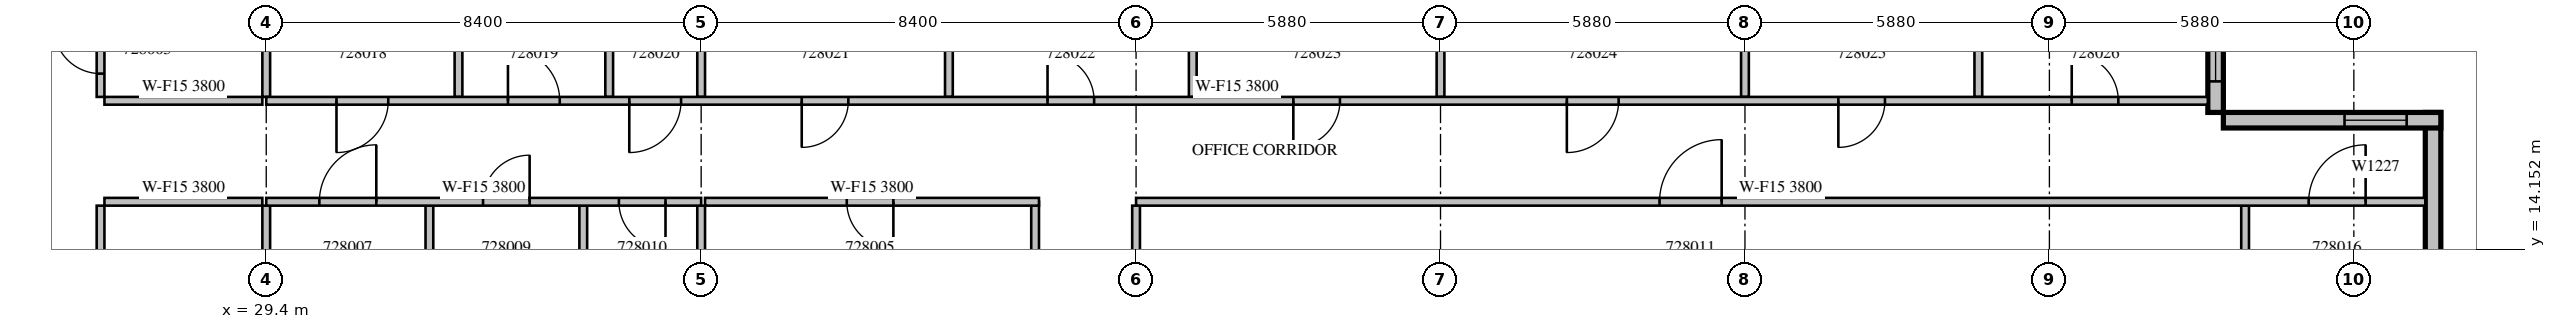
"""IFC4 building model, lengths in metres.
Left out: names, types, materials, properties, quantities, classifications, styles, units other than length and angle.
Written with IfcOpenShell. Run it as: python <this file> out.ifc"""

import sys

from ifc_helpers import new_model, si_unit, direction, frame, frame_2d, origin, place, context, subcontext, project, spatial, rectangle, extrude, source, transform, mapped, element, fill, save


model = new_model("IFC4")
c1 = context("Model", 3, precision=1e-05, world=origin(), true_north=direction((0.0, 1.0)))
c2 = subcontext(c1, "Body", "Model", "MODEL_VIEW")
j1 = project(units=[si_unit("LENGTHUNIT", "METRE"), si_unit("PLANEANGLEUNIT", "RADIAN")], contexts=[c1])
p1 = place(None, origin())
s1 = spatial("IfcSite", under=j1, at=p1, CompositionType="ELEMENT")
p2 = place(p1, origin())
s2 = spatial("IfcBuilding", under=s1, at=p2, CompositionType="ELEMENT")
p3 = place(p2, frame((0.0, 0.0, 128.7)))
s3 = spatial("IfcBuildingStorey", under=s2, at=p3, CompositionType="ELEMENT", Elevation=128.7)
m1 = source(origin(), c2, "Body", "SweptSolid", [
    extrude(rectangle(XDim=6.3, YDim=0.3, at=frame_2d((3.15, 0.0))), origin(), (0.0, 0.0, 1.0), 3.8),
])
p4 = place(p3, frame((71.25, 10.5, 0.0), z_axis=(0.0, 0.0, 1.0), x_axis=(0.0, 1.0, 0.0)))
e1 = element("IfcWall", 1, at=p4, inside=s3, PredefinedType="STANDARD", context=c2, shape_type="MappedRepresentation", body=[
    mapped(m1, transform((0.0, 0.0, 0.0), scale=1.0)),
])
m2 = source(origin(), c2, "Body", "SweptSolid", [
    extrude(rectangle(XDim=1.2, YDim=2.7, at=frame_2d((0.6, 1.35))), frame((0.0, 0.16, 0.0), z_axis=(0.0, -1.0, 0.0), x_axis=(1.0, 0.0, 0.0)), (0.0, 0.0, 1.0), 0.32),
])
p5 = place(p4, frame((1.025, 0.0, 0.6)))
e2 = element("IfcOpeningElement", 2, at=p5, cuts=e1, PredefinedType="OPENING", context=c2, shape_type="MappedRepresentation", body=[
    mapped(m2, transform((0.0, 0.0, 0.0), scale=1.0)),
])
m3 = source(origin(), c2, "Body", "SweptSolid", [
    extrude(rectangle(XDim=4.2, YDim=0.3, at=frame_2d((2.1, 0.0))), origin(), (0.0, 0.0, 1.0), 3.8),
])
p6 = place(p3, frame((71.4, 16.65, 0.0), z_axis=(0.0, 0.0, 1.0), x_axis=(-1.0, 0.0, 0.0)))
e3 = element("IfcWall", 3, at=p6, inside=s3, PredefinedType="STANDARD", context=c2, shape_type="MappedRepresentation", body=[
    mapped(m3, transform((0.0, 0.0, 0.0), scale=1.0)),
])
p7 = place(p6, frame((0.66, 0.0, 0.6)))
e4 = element("IfcOpeningElement", 4, at=p7, cuts=e3, PredefinedType="OPENING", context=c2, shape_type="MappedRepresentation", body=[
    mapped(m2, transform((0.0, 0.0, 0.0), scale=1.0)),
])
p8 = place(p3, frame((67.05, 16.8, 0.0), z_axis=(0.0, 0.0, 1.0), x_axis=(0.0, 1.0, 0.0)))
e5 = element("IfcWall", 5, at=p8, inside=s3, PredefinedType="STANDARD", context=c2, shape_type="MappedRepresentation", body=[
    mapped(m3, transform((0.0, 0.0, 0.0), scale=1.0)),
])
m4 = source(origin(), c2, "Body", "SweptSolid", [
    extrude(rectangle(XDim=3.0, YDim=2.7, at=frame_2d((1.5, 1.35))), frame((0.0, 0.16, 0.0), z_axis=(0.0, -1.0, 0.0), x_axis=(1.0, 0.0, 0.0)), (0.0, 0.0, 1.0), 0.32),
])
p9 = place(p8, frame((0.6, 0.0, 0.6)))
e6 = element("IfcOpeningElement", 6, at=p9, cuts=e5, PredefinedType="OPENING", context=c2, shape_type="MappedRepresentation", body=[
    mapped(m4, transform((0.0, 0.0, 0.0), scale=1.0)),
])
p10 = place(p3, frame((26.2, 15.0, 0.0), z_axis=(0.0, 0.0, 1.0), x_axis=(0.0, -1.0, 0.0)))
e7 = element("IfcWall", 7, at=p10, inside=s3, PredefinedType="PARTITIONING", context=c2, shape_type="SweptSolid", body=[
    extrude(rectangle(XDim=11.725, YDim=0.15, at=frame_2d((5.862, 0.0))), origin(), (0.0, 0.0, 1.0), 2.8),
])
m5 = source(origin(), c2, "Body", "SweptSolid", [
    extrude(rectangle(XDim=0.9, YDim=2.1, at=frame_2d((0.45, 1.05))), frame((0.0, 0.085, 0.0), z_axis=(0.0, -1.0, 0.0), x_axis=(1.0, 0.0, 0.0)), (0.0, 0.0, 1.0), 0.17),
])
p11 = place(p10, frame((9.463, 0.0, 0.0)))
e8 = element("IfcOpeningElement", 8, at=p11, cuts=e7, PredefinedType="OPENING", context=c2, shape_type="MappedRepresentation", body=[
    mapped(m5, transform((0.0, 0.0, 0.0), scale=1.0)),
])
p12 = place(p10, frame((2.725, 0.0, 0.0)))
e9 = element("IfcOpeningElement", 9, at=p12, cuts=e7, PredefinedType="OPENING", context=c2, shape_type="MappedRepresentation", body=[
    mapped(m5, transform((0.0, 0.0, 0.0), scale=1.0)),
])
m6 = source(origin(), c2, "Body", "SweptSolid", [
    extrude(rectangle(XDim=3.6, YDim=0.15, at=frame_2d((1.8, 0.0))), origin(), (0.0, 0.0, 1.0), 3.8),
])
p13 = place(p3, frame((26.2, 20.7, 0.0), z_axis=(0.0, 0.0, 1.0), x_axis=(0.0, -1.0, 0.0)))
e10 = element("IfcWall", 10, at=p13, inside=s3, PredefinedType="PARTITIONING", context=c2, shape_type="MappedRepresentation", body=[
    mapped(m6, transform((0.0, 0.0, 0.0), scale=1.0)),
])
p14 = place(p13, frame((2.25, 0.0, 0.0)))
e11 = element("IfcOpeningElement", 11, at=p14, cuts=e10, PredefinedType="OPENING", context=c2, shape_type="MappedRepresentation", body=[
    mapped(m5, transform((0.0, 0.0, 0.0), scale=1.0)),
])
m7 = source(origin(), c2, "Body", "SweptSolid", [
    extrude(rectangle(XDim=3.05, YDim=0.15, at=frame_2d((1.525, 0.0))), origin(), (0.0, 0.0, 1.0), 3.8),
])
for number, where, z_axis, x_axis in (
    (12, (29.325, 15.075, 0.0), (0.0, 0.0, 1.0), (-1.0, 0.0, 0.0)),
    (13, (26.275, 17.025, 0.0), (0.0, 0.0, 1.0), (1.0, 0.0, 0.0)),
):
    element("IfcWall", number, at=place(p3, frame(where, z_axis=z_axis, x_axis=x_axis)), inside=s3, PredefinedType="PARTITIONING", context=c2, shape_type="MappedRepresentation", body=[
        mapped(m7, transform((0.0, 0.0, 0.0), scale=1.0)),
    ])
m8 = source(origin(), c2, "Body", "SweptSolid", [
    extrude(rectangle(XDim=3.976, YDim=0.15, at=frame_2d((1.988, 0.0))), origin(), (0.0, 0.0, 1.0), 3.8),
])
p15 = place(p3, frame((29.4, 11.024, 0.0), z_axis=(0.0, 0.0, 1.0), x_axis=(0.0, 1.0, 0.0)))
e14 = element("IfcWall", 14, at=p15, inside=s3, PredefinedType="PARTITIONING", context=c2, shape_type="MappedRepresentation", body=[
    mapped(m8, transform((0.0, 0.0, 0.0), scale=1.0)),
])
m9 = source(origin(), c2, "Body", "SweptSolid", [
    extrude(rectangle(XDim=2.851, YDim=0.15, at=frame_2d((1.425, 0.0))), origin(), (0.0, 0.0, 1.0), 3.8),
])
p16 = place(p3, frame((29.4, 17.1, 0.0), z_axis=(0.0, 0.0, 1.0), x_axis=(0.0, 1.0, 0.0)))
e15 = element("IfcWall", 15, at=p16, inside=s3, PredefinedType="PARTITIONING", context=c2, shape_type="MappedRepresentation", body=[
    mapped(m9, transform((0.0, 0.0, 0.0), scale=1.0)),
])
m10 = source(origin(), c2, "Body", "SweptSolid", [
    extrude(rectangle(XDim=3.175, YDim=0.15, at=frame_2d((1.587, 0.0))), origin(), (0.0, 0.0, 1.0), 3.8),
])
p17 = place(p3, frame((44.25, 11.9, 0.0), z_axis=(0.0, 0.0, 1.0), x_axis=(0.0, 1.0, 0.0)))
e16 = element("IfcWall", 16, at=p17, inside=s3, PredefinedType="PARTITIONING", context=c2, shape_type="MappedRepresentation", body=[
    mapped(m10, transform((0.0, 0.0, 0.0), scale=1.0)),
])
m11 = source(origin(), c2, "Body", "SweptSolid", [
    extrude(rectangle(XDim=6.45, YDim=0.15, at=frame_2d((3.225, 0.0))), origin(), (0.0, 0.0, 1.0), 3.8),
])
p18 = place(p3, frame((44.325, 15.075, 0.0), z_axis=(0.0, 0.0, 1.0), x_axis=(-1.0, 0.0, 0.0)))
e17 = element("IfcWall", 17, at=p18, inside=s3, PredefinedType="PARTITIONING", context=c2, shape_type="MappedRepresentation", body=[
    mapped(m11, transform((0.0, 0.0, 0.0), scale=1.0)),
])
p19 = place(p18, frame((2.812, 0.0, 0.0)))
e18 = element("IfcOpeningElement", 18, at=p19, cuts=e17, PredefinedType="OPENING", context=c2, shape_type="MappedRepresentation", body=[
    mapped(m5, transform((0.0, 0.0, 0.0), scale=1.0)),
])
m12 = source(origin(), c2, "Body", "SweptSolid", [
    extrude(rectangle(XDim=3.825, YDim=0.15, at=frame_2d((1.913, 0.0))), origin(), (0.0, 0.0, 1.0), 3.8),
])
for number, where, z_axis, x_axis in (
    (19, (32.551, 11.175, 0.0), (0.0, 0.0, 1.0), (0.0, 1.0, 0.0)),
    (20, (35.523, 11.175, 0.0), (0.0, 0.0, 1.0), (0.0, 1.0, 0.0)),
    (21, (37.8, 11.175, 0.0), (0.0, 0.0, 1.0), (0.0, 1.0, 0.0)),
    (22, (46.2, 11.175, 0.0), (0.0, 0.0, 1.0), (0.0, 1.0, 0.0)),
    (23, (67.62, 11.175, 0.0), (0.0, 0.0, 1.0), (0.0, 1.0, 0.0)),
):
    element("IfcWall", number, at=place(p3, frame(where, z_axis=z_axis, x_axis=x_axis)), inside=s3, PredefinedType="PARTITIONING", context=c2, shape_type="MappedRepresentation", body=[
        mapped(m12, transform((0.0, 0.0, 0.0), scale=1.0)),
    ])
for number, where, z_axis, x_axis in (
    (24, (33.113, 20.7, 0.0), (0.0, 0.0, 1.0), (0.0, -1.0, 0.0)),
    (25, (36.024, 20.7, 0.0), (0.0, 0.0, 1.0), (0.0, -1.0, 0.0)),
    (26, (42.585, 20.7, 0.0), (0.0, 0.0, 1.0), (0.0, -1.0, 0.0)),
    (27, (47.295, 20.7, 0.0), (0.0, 0.0, 1.0), (0.0, -1.0, 0.0)),
    (28, (62.468, 20.7, 0.0), (0.0, 0.0, 1.0), (0.0, -1.0, 0.0)),
):
    element("IfcWall", number, at=place(p3, frame(where, z_axis=z_axis, x_axis=x_axis)), inside=s3, PredefinedType="PARTITIONING", context=c2, shape_type="MappedRepresentation", body=[
        mapped(m6, transform((0.0, 0.0, 0.0), scale=1.0)),
    ])
for number, where, z_axis, x_axis in (
    (29, (37.8, 17.1, 0.0), (0.0, 0.0, 1.0), (0.0, 1.0, 0.0)),
    (30, (52.08, 17.1, 0.0), (0.0, 0.0, 1.0), (0.0, 1.0, 0.0)),
    (31, (57.96, 17.1, 0.0), (0.0, 0.0, 1.0), (0.0, 1.0, 0.0)),
):
    element("IfcWall", number, at=place(p3, frame(where, z_axis=z_axis, x_axis=x_axis)), inside=s3, PredefinedType="PARTITIONING", context=c2, shape_type="MappedRepresentation", body=[
        mapped(m9, transform((0.0, 0.0, 0.0), scale=1.0)),
    ])
m13 = source(origin(), c2, "Body", "SweptSolid", [
    extrude(rectangle(XDim=8.4, YDim=0.15, at=frame_2d((4.2, 0.0))), origin(), (0.0, 0.0, 1.0), 3.8),
])
p20 = place(p3, frame((37.8, 15.075, 0.0), z_axis=(0.0, 0.0, 1.0), x_axis=(-1.0, 0.0, 0.0)))
e32 = element("IfcWall", 32, at=p20, inside=s3, PredefinedType="PARTITIONING", context=c2, shape_type="MappedRepresentation", body=[
    mapped(m13, transform((0.0, 0.0, 0.0), scale=1.0)),
])
m14 = source(origin(), c2, "Body", "SweptSolid", [
    extrude(rectangle(XDim=1.1, YDim=2.1, at=frame_2d((0.55, 1.05))), frame((0.0, 0.085, 0.0), z_axis=(0.0, -1.0, 0.0), x_axis=(1.0, 0.0, 0.0)), (0.0, 0.0, 1.0), 0.17),
])
p21 = place(p20, frame((6.274, 0.0, 0.0)))
e33 = element("IfcOpeningElement", 33, at=p21, cuts=e32, PredefinedType="OPENING", context=c2, shape_type="MappedRepresentation", body=[
    mapped(m14, transform((0.0, 0.0, 0.0), scale=1.0)),
])
p22 = place(p20, frame((3.313, 0.0, 0.0)))
e34 = element("IfcOpeningElement", 34, at=p22, cuts=e32, PredefinedType="OPENING", context=c2, shape_type="MappedRepresentation", body=[
    mapped(m5, transform((0.0, 0.0, 0.0), scale=1.0)),
])
p23 = place(p20, frame((0.689, 0.0, 0.0)))
e35 = element("IfcOpeningElement", 35, at=p23, cuts=e32, PredefinedType="OPENING", context=c2, shape_type="MappedRepresentation", body=[
    mapped(m5, transform((0.0, 0.0, 0.0), scale=1.0)),
])
m15 = source(origin(), c2, "Body", "SweptSolid", [
    extrude(rectangle(XDim=24.9, YDim=0.15, at=frame_2d((12.45, 0.0))), origin(), (0.0, 0.0, 1.0), 3.8),
])
p24 = place(p3, frame((71.1, 15.075, 0.0), z_axis=(0.0, 0.0, 1.0), x_axis=(-1.0, 0.0, 0.0)))
e36 = element("IfcWall", 36, at=p24, inside=s3, PredefinedType="PARTITIONING", context=c2, shape_type="MappedRepresentation", body=[
    mapped(m15, transform((0.0, 0.0, 0.0), scale=1.0)),
])
m16 = source(origin(), c2, "Body", "SweptSolid", [
    extrude(rectangle(XDim=1.2, YDim=2.1, at=frame_2d((0.6, 1.05))), frame((0.0, 0.085, 0.0), z_axis=(0.0, -1.0, 0.0), x_axis=(1.0, 0.0, 0.0)), (0.0, 0.0, 1.0), 0.17),
])
p25 = place(p24, frame((13.59, 0.0, 0.0)))
e37 = element("IfcOpeningElement", 37, at=p25, cuts=e36, PredefinedType="OPENING", context=c2, shape_type="MappedRepresentation", body=[
    mapped(m16, transform((0.0, 0.0, 0.0), scale=1.0)),
])
p26 = place(p24, frame((1.153, 0.0, 0.0)))
e38 = element("IfcOpeningElement", 38, at=p26, cuts=e36, PredefinedType="OPENING", context=c2, shape_type="MappedRepresentation", body=[
    mapped(m14, transform((0.0, 0.0, 0.0), scale=1.0)),
])
m17 = source(origin(), c2, "Body", "SweptSolid", [
    extrude(rectangle(XDim=37.5, YDim=0.15, at=frame_2d((18.75, 0.0))), origin(), (0.0, 0.0, 1.0), 3.8),
])
p27 = place(p3, frame((29.4, 17.025, 0.0), z_axis=(0.0, 0.0, 1.0), x_axis=(1.0, 0.0, 0.0)))
e39 = element("IfcWall", 39, at=p27, inside=s3, PredefinedType="PARTITIONING", context=c2, shape_type="MappedRepresentation", body=[
    mapped(m17, transform((0.0, 0.0, 0.0), scale=1.0)),
])
m18 = source(origin(), c2, "Body", "SweptSolid", [
    extrude(rectangle(XDim=1.0, YDim=2.1, at=frame_2d((0.5, 1.05))), frame((0.0, 0.085, 0.0), z_axis=(0.0, -1.0, 0.0), x_axis=(1.0, 0.0, 0.0)), (0.0, 0.0, 1.0), 0.17),
])
p28 = place(p27, frame((1.357, 0.0, 0.0)))
e40 = element("IfcOpeningElement", 40, at=p28, cuts=e39, PredefinedType="OPENING", context=c2, shape_type="MappedRepresentation", body=[
    mapped(m18, transform((0.0, 0.0, 0.0), scale=1.0)),
])
p29 = place(p27, frame((4.669, 0.0, 0.0)))
e41 = element("IfcOpeningElement", 41, at=p29, cuts=e39, PredefinedType="OPENING", context=c2, shape_type="MappedRepresentation", body=[
    mapped(m18, transform((0.0, 0.0, 0.0), scale=1.0)),
])
p30 = place(p27, frame((7.012, 0.0, 0.0)))
e42 = element("IfcOpeningElement", 42, at=p30, cuts=e39, PredefinedType="OPENING", context=c2, shape_type="MappedRepresentation", body=[
    mapped(m18, transform((0.0, 0.0, 0.0), scale=1.0)),
])
p31 = place(p27, frame((10.342, 0.0, 0.0)))
e43 = element("IfcOpeningElement", 43, at=p31, cuts=e39, PredefinedType="OPENING", context=c2, shape_type="MappedRepresentation", body=[
    mapped(m5, transform((0.0, 0.0, 0.0), scale=1.0)),
])
p32 = place(p27, frame((15.09, 0.0, 0.0)))
e44 = element("IfcOpeningElement", 44, at=p32, cuts=e39, PredefinedType="OPENING", context=c2, shape_type="MappedRepresentation", body=[
    mapped(m5, transform((0.0, 0.0, 0.0), scale=1.0)),
])
p33 = place(p27, frame((19.837, 0.0, 0.0)))
e45 = element("IfcOpeningElement", 45, at=p33, cuts=e39, PredefinedType="OPENING", context=c2, shape_type="MappedRepresentation", body=[
    mapped(m5, transform((0.0, 0.0, 0.0), scale=1.0)),
])
p34 = place(p27, frame((25.12, 0.0, 0.0)))
e46 = element("IfcOpeningElement", 46, at=p34, cuts=e39, PredefinedType="OPENING", context=c2, shape_type="MappedRepresentation", body=[
    mapped(m18, transform((0.0, 0.0, 0.0), scale=1.0)),
])
p35 = place(p27, frame((30.364, 0.0, 0.0)))
e47 = element("IfcOpeningElement", 47, at=p35, cuts=e39, PredefinedType="OPENING", context=c2, shape_type="MappedRepresentation", body=[
    mapped(m5, transform((0.0, 0.0, 0.0), scale=1.0)),
])
p36 = place(p27, frame((34.871, 0.0, 0.0)))
e48 = element("IfcOpeningElement", 48, at=p36, cuts=e39, PredefinedType="OPENING", context=c2, shape_type="MappedRepresentation", body=[
    mapped(m5, transform((0.0, 0.0, 0.0), scale=1.0)),
])
m19 = source(origin(), c2, "Body", "SweptSolid", [
    extrude(rectangle(XDim=1.2, YDim=2.7, at=frame_2d((0.6, 1.35))), frame((0.0, 0.03, 0.0), z_axis=(0.0, -1.0, 0.0), x_axis=(1.0, 0.0, 0.0)), (0.0, 0.0, 1.0), 0.06),
])
p37 = place(p7, origin())
e49 = element("IfcWindow", 49, at=p37, inside=s3, PartitioningType="SINGLE_PANEL", PredefinedType="WINDOW", context=c2, shape_type="MappedRepresentation", body=[
    mapped(m19, transform((0.0, 0.0, 0.0), scale=1.0)),
])
fill(e4, e49)
m20 = source(origin(), c2, "Body", "SweptSolid", [
    extrude(rectangle(XDim=3.0, YDim=2.7, at=frame_2d((1.5, 1.35))), frame((0.0, 0.03, 0.0), z_axis=(0.0, -1.0, 0.0), x_axis=(1.0, 0.0, 0.0)), (0.0, 0.0, 1.0), 0.06),
])
p38 = place(p9, origin())
e50 = element("IfcWindow", 50, at=p38, inside=s3, PartitioningType="SINGLE_PANEL", PredefinedType="WINDOW", context=c2, shape_type="MappedRepresentation", body=[
    mapped(m20, transform((0.0, 0.0, 0.0), scale=1.0)),
])
fill(e6, e50)
m21 = source(origin(), c2, "Body", "SweptSolid", [
    extrude(rectangle(XDim=0.9, YDim=2.1, at=frame_2d((0.45, 1.05))), frame((0.0, 0.025, 0.0), z_axis=(0.0, -1.0, 0.0), x_axis=(1.0, 0.0, 0.0)), (0.0, 0.0, 1.0), 0.05),
])
p39 = place(p14, origin())
e51 = element("IfcDoor", 51, at=p39, inside=s3, OperationType="SINGLE_SWING_RIGHT", PredefinedType="DOOR", context=c2, shape_type="MappedRepresentation", body=[
    mapped(m21, transform((0.0, 0.0, 0.0), scale=1.0)),
])
fill(e11, e51)
p40 = place(p19, origin())
e52 = element("IfcDoor", 52, at=p40, inside=s3, OperationType="SINGLE_SWING_LEFT", PredefinedType="DOOR", context=c2, shape_type="MappedRepresentation", body=[
    mapped(m21, transform((0.0, 0.0, 0.0), scale=1.0)),
])
fill(e18, e52)
m22 = source(origin(), c2, "Body", "SweptSolid", [
    extrude(rectangle(XDim=1.1, YDim=2.1, at=frame_2d((0.55, 1.05))), frame((0.0, 0.025, 0.0), z_axis=(0.0, -1.0, 0.0), x_axis=(1.0, 0.0, 0.0)), (0.0, 0.0, 1.0), 0.05),
])
p41 = place(p21, origin())
e53 = element("IfcDoor", 53, at=p41, inside=s3, OperationType="SINGLE_SWING_RIGHT", PredefinedType="DOOR", context=c2, shape_type="MappedRepresentation", body=[
    mapped(m22, transform((0.0, 0.0, 0.0), scale=1.0)),
])
fill(e33, e53)
p42 = place(p22, origin())
e54 = element("IfcDoor", 54, at=p42, inside=s3, OperationType="SINGLE_SWING_RIGHT", PredefinedType="DOOR", context=c2, shape_type="MappedRepresentation", body=[
    mapped(m21, transform((0.0, 0.0, 0.0), scale=1.0)),
])
fill(e34, e54)
p43 = place(p23, origin())
e55 = element("IfcDoor", 55, at=p43, inside=s3, OperationType="SINGLE_SWING_LEFT", PredefinedType="DOOR", context=c2, shape_type="MappedRepresentation", body=[
    mapped(m21, transform((0.0, 0.0, 0.0), scale=1.0)),
])
fill(e35, e55)
m23 = source(origin(), c2, "Body", "SweptSolid", [
    extrude(rectangle(XDim=1.2, YDim=2.1, at=frame_2d((0.6, 1.05))), frame((0.0, 0.025, 0.0), z_axis=(0.0, -1.0, 0.0), x_axis=(1.0, 0.0, 0.0)), (0.0, 0.0, 1.0), 0.05),
])
p44 = place(p25, origin())
e56 = element("IfcDoor", 56, at=p44, inside=s3, OperationType="SINGLE_SWING_RIGHT", PredefinedType="DOOR", context=c2, shape_type="MappedRepresentation", body=[
    mapped(m23, transform((0.0, 0.0, 0.0), scale=1.0)),
])
fill(e37, e56)
p45 = place(p26, origin())
e57 = element("IfcDoor", 57, at=p45, inside=s3, OperationType="SINGLE_SWING_RIGHT", PredefinedType="DOOR", context=c2, shape_type="MappedRepresentation", body=[
    mapped(m22, transform((0.0, 0.0, 0.0), scale=1.0)),
])
fill(e38, e57)
m24 = source(origin(), c2, "Body", "SweptSolid", [
    extrude(rectangle(XDim=1.0, YDim=2.1, at=frame_2d((0.5, 1.05))), frame((0.0, 0.025, 0.0), z_axis=(0.0, -1.0, 0.0), x_axis=(1.0, 0.0, 0.0)), (0.0, 0.0, 1.0), 0.05),
])
p46 = place(p28, origin())
e58 = element("IfcDoor", 58, at=p46, inside=s3, OperationType="SINGLE_SWING_RIGHT", PredefinedType="DOOR", context=c2, shape_type="MappedRepresentation", body=[
    mapped(m24, transform((0.0, 0.0, 0.0), scale=1.0)),
])
fill(e40, e58)
p47 = place(p29, origin())
e59 = element("IfcDoor", 59, at=p47, inside=s3, OperationType="SINGLE_SWING_LEFT", PredefinedType="DOOR", context=c2, shape_type="MappedRepresentation", body=[
    mapped(m24, transform((0.0, 0.0, 0.0), scale=1.0)),
])
fill(e41, e59)
p48 = place(p30, origin())
e60 = element("IfcDoor", 60, at=p48, inside=s3, OperationType="SINGLE_SWING_RIGHT", PredefinedType="DOOR", context=c2, shape_type="MappedRepresentation", body=[
    mapped(m24, transform((0.0, 0.0, 0.0), scale=1.0)),
])
fill(e42, e60)
p49 = place(p31, origin())
e61 = element("IfcDoor", 61, at=p49, inside=s3, OperationType="SINGLE_SWING_RIGHT", PredefinedType="DOOR", context=c2, shape_type="MappedRepresentation", body=[
    mapped(m21, transform((0.0, 0.0, 0.0), scale=1.0)),
])
fill(e43, e61)
p50 = place(p32, origin())
e62 = element("IfcDoor", 62, at=p50, inside=s3, OperationType="SINGLE_SWING_LEFT", PredefinedType="DOOR", context=c2, shape_type="MappedRepresentation", body=[
    mapped(m21, transform((0.0, 0.0, 0.0), scale=1.0)),
])
fill(e44, e62)
p51 = place(p33, origin())
e63 = element("IfcDoor", 63, at=p51, inside=s3, OperationType="SINGLE_SWING_RIGHT", PredefinedType="DOOR", context=c2, shape_type="MappedRepresentation", body=[
    mapped(m21, transform((0.0, 0.0, 0.0), scale=1.0)),
])
fill(e45, e63)
p52 = place(p34, origin())
e64 = element("IfcDoor", 64, at=p52, inside=s3, OperationType="SINGLE_SWING_RIGHT", PredefinedType="DOOR", context=c2, shape_type="MappedRepresentation", body=[
    mapped(m24, transform((0.0, 0.0, 0.0), scale=1.0)),
])
fill(e46, e64)
p53 = place(p35, origin())
e65 = element("IfcDoor", 65, at=p53, inside=s3, OperationType="SINGLE_SWING_RIGHT", PredefinedType="DOOR", context=c2, shape_type="MappedRepresentation", body=[
    mapped(m21, transform((0.0, 0.0, 0.0), scale=1.0)),
])
fill(e47, e65)
p54 = place(p36, origin())
e66 = element("IfcDoor", 66, at=p54, inside=s3, OperationType="SINGLE_SWING_LEFT", PredefinedType="DOOR", context=c2, shape_type="MappedRepresentation", body=[
    mapped(m21, transform((0.0, 0.0, 0.0), scale=1.0)),
])
fill(e48, e66)
save(model, sys.argv[1])
